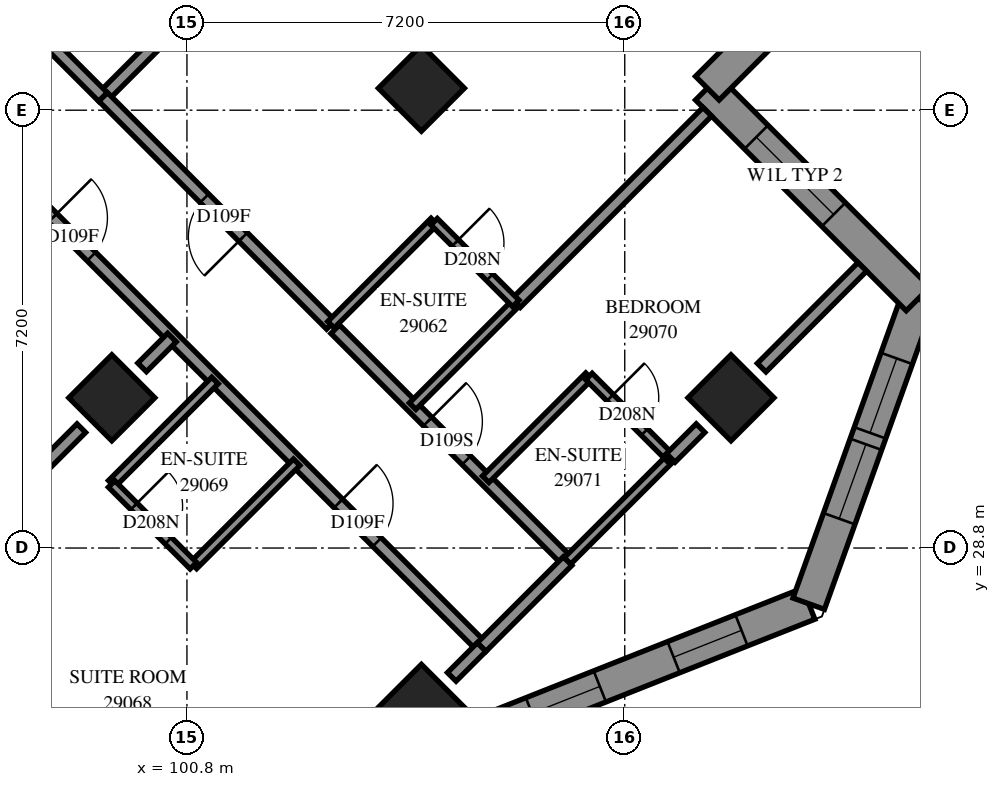
"""IFC4 building model, lengths in metres.
Left out: names, types, materials, properties, quantities, classifications, styles, units other than length and angle.
Written with IfcOpenShell. Run it as: python <this file> out.ifc"""

import sys

from ifc_helpers import new_model, si_unit, direction, frame, frame_2d, origin, origin_2d, place, context, subcontext, project, spatial, polyline, rectangle, outline, extrude, element, fill, save


model = new_model("IFC4")
c1 = context("Model", 3, precision=1e-05, world=origin(), true_north=direction((0.0, 1.0)))
c2 = subcontext(c1, "Body", "Model", "MODEL_VIEW")
j1 = project(units=[si_unit("LENGTHUNIT", "METRE"), si_unit("PLANEANGLEUNIT", "RADIAN")], contexts=[c1])
p1 = place(None, origin())
s1 = spatial("IfcSite", under=j1, at=p1, CompositionType="ELEMENT")
p2 = place(p1, origin())
s2 = spatial("IfcBuilding", under=s1, at=p2, CompositionType="ELEMENT")
p3 = place(p2, frame((0.0, 0.0, 108.4)))
s3 = spatial("IfcBuildingStorey", under=s2, at=p3, CompositionType="ELEMENT", Elevation=108.4)
for number, where, z_axis, x_axis in (
    (1, (104.656, 36.362, 0.0), (0.0, 0.0, 1.0), (0.707, -0.707, 0.0)),
    (2, (99.565, 31.271, 0.0), (0.0, 0.0, 1.0), (0.707, -0.707, 0.0)),
    (3, (109.747, 31.271, 0.0), (0.0, 0.0, 1.0), (0.707, -0.707, 0.0)),
    (4, (104.656, 26.18, 0.0), (0.0, 0.0, 1.0), (0.707, -0.707, 0.0)),
):
    element("IfcColumn", number, at=place(p3, frame(where, z_axis=z_axis, x_axis=x_axis)), inside=s3, PredefinedType="COLUMN", context=c2, shape_type="SweptSolid", body=[
        extrude(rectangle(XDim=1.0, YDim=1.0, at=origin_2d()), origin(), (0.0, 0.0, 1.0), 3.1),
    ])
p4 = place(p3, frame((105.879, 25.846, 0.0), z_axis=(0.0, 0.0, 1.0), x_axis=(0.9297321514, 0.368236509, 0.0)))
e5 = element("IfcWall", 5, at=p4, inside=s3, PredefinedType="SOLIDWALL", context=c2, shape_type="SweptSolid", body=[
    extrude(outline(polyline([(0.119, -0.275), (5.66, -0.275), (5.411, 0.275), (-0.119, 0.275), (0.119, -0.275)])), origin(), (0.0, 0.0, 1.0), 3.1),
])
p5 = place(p4, frame((0.641, 0.0, 0.5)))
e6 = element("IfcOpeningElement", 6, at=p5, cuts=e5, PredefinedType="OPENING", context=c2, shape_type="SweptSolid", body=[
    extrude(rectangle(XDim=1.2, YDim=2.45, at=frame_2d((0.6, 1.225))), frame((0.0, 0.285, 0.0), z_axis=(0.0, -1.0, 0.0), x_axis=(1.0, 0.0, 0.0)), (0.0, 0.0, 1.0), 0.57),
])
p6 = place(p4, frame((3.146, 0.0, 0.5)))
e7 = element("IfcOpeningElement", 7, at=p6, cuts=e5, PredefinedType="OPENING", context=c2, shape_type="SweptSolid", body=[
    extrude(rectangle(XDim=1.2, YDim=2.45, at=frame_2d((0.6, 1.225))), frame((0.0, 0.285, 0.0), z_axis=(0.0, -1.0, 0.0), x_axis=(1.0, 0.0, 0.0)), (0.0, 0.0, 1.0), 0.57),
])
p7 = place(p3, frame((111.025, 27.885, 0.0), z_axis=(0.0, 0.0, 1.0), x_axis=(0.3376911299, 0.9412569791, 0.0)))
e8 = element("IfcWall", 8, at=p7, inside=s3, PredefinedType="SOLIDWALL", context=c2, shape_type="SweptSolid", body=[
    extrude(outline(polyline([(-0.124, -0.275), (5.499, -0.275), (5.15, 0.275), (0.124, 0.275), (-0.124, -0.275)])), origin(), (0.0, 0.0, 1.0), 3.1),
])
p8 = place(p7, frame((1.485, 0.0, 0.5)))
e9 = element("IfcOpeningElement", 9, at=p8, cuts=e8, PredefinedType="OPENING", context=c2, shape_type="SweptSolid", body=[
    extrude(rectangle(XDim=1.3, YDim=2.45, at=frame_2d((0.65, 1.225))), frame((0.0, 0.285, 0.0), z_axis=(0.0, -1.0, 0.0), x_axis=(1.0, 0.0, 0.0)), (0.0, 0.0, 1.0), 0.57),
])
p9 = place(p7, frame((2.985, 0.0, 0.5)))
e10 = element("IfcOpeningElement", 10, at=p9, cuts=e8, PredefinedType="OPENING", context=c2, shape_type="SweptSolid", body=[
    extrude(rectangle(XDim=1.3, YDim=2.45, at=frame_2d((0.65, 1.225))), frame((0.0, 0.285, 0.0), z_axis=(0.0, -1.0, 0.0), x_axis=(1.0, 0.0, 0.0)), (0.0, 0.0, 1.0), 0.57),
])
p10 = place(p3, frame((112.823, 32.897, 0.0), z_axis=(0.0, 0.0, 1.0), x_axis=(-0.7071067812, 0.7071067812, 0.0)))
e11 = element("IfcWall", 11, at=p10, inside=s3, PredefinedType="SOLIDWALL", context=c2, shape_type="SweptSolid", body=[
    extrude(outline(polyline([(-0.174, -0.275), (4.626, -0.275), (5.176, 0.275), (0.174, 0.275), (-0.174, -0.275)])), origin(), (0.0, 0.0, 1.0), 3.1),
])
p11 = place(p10, frame((1.963, 0.0, 0.6)))
e12 = element("IfcOpeningElement", 12, at=p11, cuts=e11, PredefinedType="OPENING", context=c2, shape_type="SweptSolid", body=[
    extrude(rectangle(XDim=1.8, YDim=1.9, at=frame_2d((0.9, 0.95))), frame((0.0, 0.285, 0.0), z_axis=(0.0, -1.0, 0.0), x_axis=(1.0, 0.0, 0.0)), (0.0, 0.0, 1.0), 0.57),
])
p12 = place(p3, frame((109.358, 36.362, 0.0), z_axis=(0.0, 0.0, 1.0), x_axis=(0.7071067812, 0.7071067812, 0.0)))
e13 = element("IfcWall", 13, at=p12, inside=s3, PredefinedType="SOLIDWALL", context=c2, shape_type="SweptSolid", body=[
    extrude(outline(polyline([(0.275, -0.275), (6.217, -0.275), (5.453, 0.275), (-0.275, 0.275), (0.275, -0.275)])), origin(), (0.0, 0.0, 1.0), 3.1),
])
p13 = place(p12, frame((1.137, 0.0, 0.6)))
e14 = element("IfcOpeningElement", 14, at=p13, cuts=e13, PredefinedType="OPENING", context=c2, shape_type="SweptSolid", body=[
    extrude(rectangle(XDim=1.8, YDim=1.9, at=frame_2d((0.9, 0.95))), frame((0.0, 0.285, 0.0), z_axis=(0.0, -1.0, 0.0), x_axis=(1.0, 0.0, 0.0)), (0.0, 0.0, 1.0), 0.57),
])
p14 = place(p3, frame((92.004, 40.819, 0.0), z_axis=(0.0, 0.0, 1.0), x_axis=(0.7071067812, -0.7071067812, 0.0)))
e15 = element("IfcWall", 15, at=p14, inside=s3, PredefinedType="PARTITIONING", context=c2, shape_type="SweptSolid", body=[
    extrude(rectangle(XDim=19.298, YDim=0.2, at=frame_2d((9.649, 0.0))), origin(), (0.0, 0.0, 1.0), 3.1),
])
p15 = place(p14, frame((3.489, 0.0, 0.0)))
e16 = element("IfcOpeningElement", 16, at=p15, cuts=e15, PredefinedType="OPENING", context=c2, shape_type="SweptSolid", body=[
    extrude(rectangle(XDim=0.9, YDim=2.1, at=frame_2d((0.45, 1.05))), frame((0.0, 0.11, 0.0), z_axis=(0.0, -1.0, 0.0), x_axis=(1.0, 0.0, 0.0)), (0.0, 0.0, 1.0), 0.22),
])
p16 = place(p14, frame((9.319, 0.0, 0.0)))
e17 = element("IfcOpeningElement", 17, at=p16, cuts=e15, PredefinedType="OPENING", context=c2, shape_type="SweptSolid", body=[
    extrude(rectangle(XDim=0.9, YDim=2.1, at=frame_2d((0.45, 1.05))), frame((0.0, 0.11, 0.0), z_axis=(0.0, -1.0, 0.0), x_axis=(1.0, 0.0, 0.0)), (0.0, 0.0, 1.0), 0.22),
])
p17 = place(p14, frame((15.961, 0.0, 0.0)))
e18 = element("IfcOpeningElement", 18, at=p17, cuts=e15, PredefinedType="OPENING", context=c2, shape_type="SweptSolid", body=[
    extrude(rectangle(XDim=0.9, YDim=2.1, at=frame_2d((0.45, 1.05))), frame((0.0, 0.11, 0.0), z_axis=(0.0, -1.0, 0.0), x_axis=(1.0, 0.0, 0.0)), (0.0, 0.0, 1.0), 0.22),
])
p18 = place(p3, frame((99.423, 36.221, 0.0), z_axis=(0.0, 0.0, 1.0), x_axis=(0.7071067812, 0.7071067812, 0.0)))
e19 = element("IfcWall", 19, at=p18, inside=s3, PredefinedType="PARTITIONING", context=c2, shape_type="SweptSolid", body=[
    extrude(rectangle(XDim=12.125, YDim=0.2, at=frame_2d((6.062, 0.0))), origin(), (0.0, 0.0, 1.0), 3.1),
])
p19 = place(p3, frame((93.411, 42.227, 0.0), z_axis=(0.0, 0.0, 1.0), x_axis=(0.7071067812, -0.7071067812, 0.0)))
e20 = element("IfcWall", 20, at=p19, inside=s3, PredefinedType="PARTITIONING", context=c2, shape_type="SweptSolid", body=[
    extrude(rectangle(XDim=8.499, YDim=0.2, at=frame_2d((4.25, 0.0))), origin(), (0.0, 0.0, 1.0), 3.1),
])
p20 = place(p19, frame((3.672, 0.0, 0.0)))
e21 = element("IfcOpeningElement", 21, at=p20, cuts=e20, PredefinedType="OPENING", context=c2, shape_type="SweptSolid", body=[
    extrude(rectangle(XDim=1.0, YDim=2.1, at=frame_2d((0.5, 1.05))), frame((0.0, 0.11, 0.0), z_axis=(0.0, -1.0, 0.0), x_axis=(1.0, 0.0, 0.0)), (0.0, 0.0, 1.0), 0.22),
])
p21 = place(p3, frame((94.973, 26.681, 0.0), z_axis=(0.0, 0.0, 1.0), x_axis=(0.7071067812, 0.7071067812, 0.0)))
e22 = element("IfcWall", 22, at=p21, inside=s3, PredefinedType="PARTITIONING", context=c2, shape_type="SweptSolid", body=[
    extrude(rectangle(XDim=5.784, YDim=0.2, at=frame_2d((2.892, 0.0))), origin(), (0.0, 0.0, 1.0), 3.1),
])
p22 = place(p3, frame((103.239, 32.399, 0.0), z_axis=(0.0, 0.0, 1.0), x_axis=(0.7071067812, -0.7071067812, 0.0)))
e23 = element("IfcWall", 23, at=p22, inside=s3, PredefinedType="PARTITIONING", context=c2, shape_type="SweptSolid", body=[
    extrude(rectangle(XDim=5.399, YDim=0.2, at=frame_2d((2.7, 0.0))), origin(), (0.0, 0.0, 1.0), 3.1),
])
p23 = place(p22, frame((2.15, 0.0, 0.0)))
e24 = element("IfcOpeningElement", 24, at=p23, cuts=e23, PredefinedType="OPENING", context=c2, shape_type="SweptSolid", body=[
    extrude(rectangle(XDim=0.9, YDim=2.1, at=frame_2d((0.45, 1.05))), frame((0.0, 0.11, 0.0), z_axis=(0.0, -1.0, 0.0), x_axis=(1.0, 0.0, 0.0)), (0.0, 0.0, 1.0), 0.22),
])
p24 = place(p3, frame((103.168, 32.47, 0.0), z_axis=(0.0, 0.0, 1.0), x_axis=(-0.7067858967, 0.7074275201, 0.0)))
e25 = element("IfcWall", 25, at=p24, inside=s3, PredefinedType="PARTITIONING", context=c2, shape_type="SweptSolid", body=[
    extrude(rectangle(XDim=5.299, YDim=0.2, at=frame_2d((2.65, 0.0))), origin(), (0.0, 0.0, 1.0), 3.1),
])
p25 = place(p24, frame((2.043, 0.0, 0.0)))
e26 = element("IfcOpeningElement", 26, at=p25, cuts=e25, PredefinedType="OPENING", context=c2, shape_type="SweptSolid", body=[
    extrude(rectangle(XDim=0.9, YDim=2.1, at=frame_2d((0.45, 1.05))), frame((0.0, 0.11, 0.0), z_axis=(0.0, -1.0, 0.0), x_axis=(1.0, 0.0, 0.0)), (0.0, 0.0, 1.0), 0.22),
])
p26 = place(p3, frame((106.211, 32.827, 0.0), z_axis=(0.0, 0.0, 1.0), x_axis=(0.7071067812, 0.7071067812, 0.0)))
e27 = element("IfcWall", 27, at=p26, inside=s3, PredefinedType="PARTITIONING", context=c2, shape_type="SweptSolid", body=[
    extrude(rectangle(XDim=4.45, YDim=0.2, at=frame_2d((2.225, 0.0))), origin(), (0.0, 0.0, 1.0), 3.1),
])
for number, where, z_axis, x_axis in (
    (28, (103.169, 32.473, 0.0), (0.0, 0.0, 1.0), (0.707, 0.707, 0.0)),
    (29, (99.563, 29.857, 0.0), (0.0, 0.0, 1.0), (0.707, 0.707, 0.0)),
    (30, (100.907, 28.513, 0.0), (0.0, 0.0, 1.0), (0.707, 0.707, 0.0)),
):
    element("IfcWall", number, at=place(p3, frame(where, z_axis=z_axis, x_axis=x_axis)), inside=s3, PredefinedType="PARTITIONING", context=c2, shape_type="SweptSolid", body=[
        extrude(rectangle(XDim=2.401, YDim=0.15, at=frame_2d((1.201, 0.0))), origin(), (0.0, 0.0, 1.0), 3.1),
    ])
for number, where, z_axis, x_axis in (
    (31, (104.511, 31.133, 0.0), (0.0, 0.0, 1.0), (0.708, 0.707, 0.0)),
    (32, (105.713, 29.931, 0.0), (0.0, 0.0, 1.0), (0.708, 0.707, 0.0)),
):
    element("IfcWall", number, at=place(p3, frame(where, z_axis=z_axis, x_axis=x_axis)), inside=s3, PredefinedType="PARTITIONING", context=c2, shape_type="SweptSolid", body=[
        extrude(rectangle(XDim=2.4, YDim=0.15, at=frame_2d((1.2, 0.0))), origin(), (0.0, 0.0, 1.0), 3.1),
    ])
p27 = place(p3, frame((107.057, 28.587, 0.0), z_axis=(0.0, 0.0, 1.0), x_axis=(0.7075233388, 0.706689978, 0.0)))
e33 = element("IfcWall", 33, at=p27, inside=s3, PredefinedType="PARTITIONING", context=c2, shape_type="SweptSolid", body=[
    extrude(rectangle(XDim=2.4, YDim=0.15, at=frame_2d((1.2, 0.0))), origin(), (0.0, 0.0, 1.0), 2.6),
])
p28 = place(p3, frame((110.251, 31.767, 0.0), z_axis=(0.0, 0.0, 1.0), x_axis=(0.7066584143, 0.7075548639, 0.0)))
e34 = element("IfcWall", 34, at=p28, inside=s3, PredefinedType="PARTITIONING", context=c2, shape_type="SweptSolid", body=[
    extrude(rectangle(XDim=2.343, YDim=0.2, at=frame_2d((1.171, 0.0))), origin(), (0.0, 0.0, 1.0), 3.1),
])
p29 = place(p3, frame((105.645, 27.171, 0.0), z_axis=(0.0, 0.0, 1.0), x_axis=(0.7071067812, 0.7071067812, 0.0)))
e35 = element("IfcWall", 35, at=p29, inside=s3, PredefinedType="PARTITIONING", context=c2, shape_type="SweptSolid", body=[
    extrude(rectangle(XDim=2.0, YDim=0.2, at=frame_2d((1.0, 0.0))), origin(), (0.0, 0.0, 1.0), 2.6),
])
p30 = place(p3, frame((99.561, 29.853, 0.0), z_axis=(0.0, 0.0, 1.0), x_axis=(0.7071067812, -0.7071067812, 0.0)))
e36 = element("IfcWall", 36, at=p30, inside=s3, PredefinedType="PARTITIONING", context=c2, shape_type="SweptSolid", body=[
    extrude(rectangle(XDim=1.901, YDim=0.15, at=frame_2d((0.95, 0.0))), origin(), (0.0, 0.0, 1.0), 3.1),
])
p31 = place(p30, frame((0.519, 0.0, 0.0)))
e37 = element("IfcOpeningElement", 37, at=p31, cuts=e36, PredefinedType="OPENING", context=c2, shape_type="SweptSolid", body=[
    extrude(rectangle(XDim=0.8, YDim=2.1, at=frame_2d((0.4, 1.05))), frame((0.0, 0.085, 0.0), z_axis=(0.0, -1.0, 0.0), x_axis=(1.0, 0.0, 0.0)), (0.0, 0.0, 1.0), 0.17),
])
p32 = place(p3, frame((107.411, 31.621, 0.0), z_axis=(0.0, 0.0, 1.0), x_axis=(0.7071067812, -0.7071067812, 0.0)))
e38 = element("IfcWall", 38, at=p32, inside=s3, PredefinedType="PARTITIONING", context=c2, shape_type="SweptSolid", body=[
    extrude(rectangle(XDim=1.901, YDim=0.15, at=frame_2d((0.95, 0.0))), origin(), (0.0, 0.0, 1.0), 3.1),
])
p33 = place(p32, frame((0.493, 0.0, 0.0)))
e39 = element("IfcOpeningElement", 39, at=p33, cuts=e38, PredefinedType="OPENING", context=c2, shape_type="SweptSolid", body=[
    extrude(rectangle(XDim=0.8, YDim=2.1, at=frame_2d((0.4, 1.05))), frame((0.0, 0.085, 0.0), z_axis=(0.0, -1.0, 0.0), x_axis=(1.0, 0.0, 0.0)), (0.0, 0.0, 1.0), 0.17),
])
p34 = place(p3, frame((104.865, 34.167, 0.0), z_axis=(0.0, 0.0, 1.0), x_axis=(0.7071067812, -0.7071067812, 0.0)))
e40 = element("IfcWall", 40, at=p34, inside=s3, PredefinedType="PARTITIONING", context=c2, shape_type="SweptSolid", body=[
    extrude(rectangle(XDim=1.901, YDim=0.15, at=frame_2d((0.95, 0.0))), origin(), (0.0, 0.0, 1.0), 3.1),
])
p35 = place(p34, frame((0.493, 0.0, 0.0)))
e41 = element("IfcOpeningElement", 41, at=p35, cuts=e40, PredefinedType="OPENING", context=c2, shape_type="SweptSolid", body=[
    extrude(rectangle(XDim=0.8, YDim=2.1, at=frame_2d((0.4, 1.05))), frame((0.0, 0.085, 0.0), z_axis=(0.0, -1.0, 0.0), x_axis=(1.0, 0.0, 0.0)), (0.0, 0.0, 1.0), 0.17),
])
for number, where, z_axis, x_axis in (
    (42, (105.155, 26.681, 0.0), (0.0, 0.0, 1.0), (0.707, 0.707, 0.0)),
    (43, (108.756, 30.282, 0.0), (0.0, 0.0, 1.0), (0.707, 0.707, 0.0)),
):
    element("IfcWall", number, at=place(p3, frame(where, z_axis=z_axis, x_axis=x_axis)), inside=s3, PredefinedType="PARTITIONING", context=c2, shape_type="SweptSolid", body=[
        extrude(rectangle(XDim=0.693, YDim=0.2, at=frame_2d((0.346, 0.0))), origin(), (0.0, 0.0, 1.0), 2.6),
    ])
p36 = place(p3, frame((100.063, 31.771, 0.0), z_axis=(0.0, 0.0, 1.0), x_axis=(0.7071067812, 0.7071067812, 0.0)))
e44 = element("IfcWall", 44, at=p36, inside=s3, PredefinedType="PARTITIONING", context=c2, shape_type="SweptSolid", body=[
    extrude(rectangle(XDim=0.693, YDim=0.2, at=frame_2d((0.346, 0.0))), origin(), (0.0, 0.0, 1.0), 3.1),
])
p37 = place(p5, origin())
e45 = element("IfcWindow", 45, at=p37, inside=s3, PartitioningType="SINGLE_PANEL", PredefinedType="WINDOW", context=c2, shape_type="SweptSolid", body=[
    extrude(rectangle(XDim=1.2, YDim=2.45, at=frame_2d((0.6, 1.225))), frame((0.0, 0.155, 0.0), z_axis=(0.0, -1.0, 0.0), x_axis=(1.0, 0.0, 0.0)), (0.0, 0.0, 1.0), 0.06),
])
fill(e6, e45)
p38 = place(p6, origin())
e46 = element("IfcWindow", 46, at=p38, inside=s3, PartitioningType="SINGLE_PANEL", PredefinedType="WINDOW", context=c2, shape_type="SweptSolid", body=[
    extrude(rectangle(XDim=1.2, YDim=2.45, at=frame_2d((0.6, 1.225))), frame((0.0, 0.155, 0.0), z_axis=(0.0, -1.0, 0.0), x_axis=(1.0, 0.0, 0.0)), (0.0, 0.0, 1.0), 0.06),
])
fill(e7, e46)
p39 = place(p8, origin())
e47 = element("IfcWindow", 47, at=p39, inside=s3, PartitioningType="SINGLE_PANEL", PredefinedType="WINDOW", context=c2, shape_type="SweptSolid", body=[
    extrude(rectangle(XDim=1.3, YDim=2.45, at=frame_2d((0.65, 1.225))), frame((0.0, 0.155, 0.0), z_axis=(0.0, -1.0, 0.0), x_axis=(1.0, 0.0, 0.0)), (0.0, 0.0, 1.0), 0.06),
])
fill(e9, e47)
p40 = place(p9, origin())
e48 = element("IfcWindow", 48, at=p40, inside=s3, PartitioningType="SINGLE_PANEL", PredefinedType="WINDOW", context=c2, shape_type="SweptSolid", body=[
    extrude(rectangle(XDim=1.3, YDim=2.45, at=frame_2d((0.65, 1.225))), frame((0.0, 0.155, 0.0), z_axis=(0.0, -1.0, 0.0), x_axis=(1.0, 0.0, 0.0)), (0.0, 0.0, 1.0), 0.06),
])
fill(e10, e48)
p41 = place(p11, origin())
e49 = element("IfcWindow", 49, at=p41, inside=s3, PartitioningType="SINGLE_PANEL", PredefinedType="WINDOW", context=c2, shape_type="SweptSolid", body=[
    extrude(rectangle(XDim=1.8, YDim=1.9, at=frame_2d((0.9, 0.95))), frame((0.0, 0.155, 0.0), z_axis=(0.0, -1.0, 0.0), x_axis=(1.0, 0.0, 0.0)), (0.0, 0.0, 1.0), 0.06),
])
fill(e12, e49)
p42 = place(p25, origin())
e50 = element("IfcDoor", 50, at=p42, inside=s3, OperationType="SINGLE_SWING_RIGHT", PredefinedType="DOOR", context=c2, shape_type="SweptSolid", body=[
    extrude(rectangle(XDim=0.9, YDim=2.1, at=frame_2d((0.45, 1.05))), frame((0.0, 0.025, 0.0), z_axis=(0.0, -1.0, 0.0), x_axis=(1.0, 0.0, 0.0)), (0.0, 0.0, 1.0), 0.05),
])
fill(e26, e50)
p43 = place(p35, origin())
e51 = element("IfcDoor", 51, at=p43, inside=s3, OperationType="SINGLE_SWING_RIGHT", PredefinedType="DOOR", context=c2, shape_type="SweptSolid", body=[
    extrude(rectangle(XDim=0.8, YDim=2.1, at=frame_2d((0.4, 1.05))), frame((0.0, 0.025, 0.0), z_axis=(0.0, -1.0, 0.0), x_axis=(1.0, 0.0, 0.0)), (0.0, 0.0, 1.0), 0.05),
])
fill(e41, e51)
p44 = place(p16, origin())
e52 = element("IfcDoor", 52, at=p44, inside=s3, OperationType="SINGLE_SWING_RIGHT", PredefinedType="DOOR", context=c2, shape_type="SweptSolid", body=[
    extrude(rectangle(XDim=0.9, YDim=2.1, at=frame_2d((0.45, 1.05))), frame((0.0, 0.025, 0.0), z_axis=(0.0, -1.0, 0.0), x_axis=(1.0, 0.0, 0.0)), (0.0, 0.0, 1.0), 0.05),
])
fill(e17, e52)
p45 = place(p17, origin())
e53 = element("IfcDoor", 53, at=p45, inside=s3, OperationType="SINGLE_SWING_RIGHT", PredefinedType="DOOR", context=c2, shape_type="SweptSolid", body=[
    extrude(rectangle(XDim=0.9, YDim=2.1, at=frame_2d((0.45, 1.05))), frame((0.0, 0.025, 0.0), z_axis=(0.0, -1.0, 0.0), x_axis=(1.0, 0.0, 0.0)), (0.0, 0.0, 1.0), 0.05),
])
fill(e18, e53)
p46 = place(p31, origin())
e54 = element("IfcDoor", 54, at=p46, inside=s3, OperationType="SINGLE_SWING_RIGHT", PredefinedType="DOOR", context=c2, shape_type="SweptSolid", body=[
    extrude(rectangle(XDim=0.8, YDim=2.1, at=frame_2d((0.4, 1.05))), frame((0.0, 0.025, 0.0), z_axis=(0.0, -1.0, 0.0), x_axis=(1.0, 0.0, 0.0)), (0.0, 0.0, 1.0), 0.05),
])
fill(e37, e54)
p47 = place(p23, origin())
e55 = element("IfcDoor", 55, at=p47, inside=s3, OperationType="SINGLE_SWING_RIGHT", PredefinedType="DOOR", context=c2, shape_type="SweptSolid", body=[
    extrude(rectangle(XDim=0.9, YDim=2.1, at=frame_2d((0.45, 1.05))), frame((0.0, 0.025, 0.0), z_axis=(0.0, -1.0, 0.0), x_axis=(1.0, 0.0, 0.0)), (0.0, 0.0, 1.0), 0.05),
])
fill(e24, e55)
p48 = place(p33, origin())
e56 = element("IfcDoor", 56, at=p48, inside=s3, OperationType="SINGLE_SWING_RIGHT", PredefinedType="DOOR", context=c2, shape_type="SweptSolid", body=[
    extrude(rectangle(XDim=0.8, YDim=2.1, at=frame_2d((0.4, 1.05))), frame((0.0, 0.025, 0.0), z_axis=(0.0, -1.0, 0.0), x_axis=(1.0, 0.0, 0.0)), (0.0, 0.0, 1.0), 0.05),
])
fill(e39, e56)
save(model, sys.argv[1])
